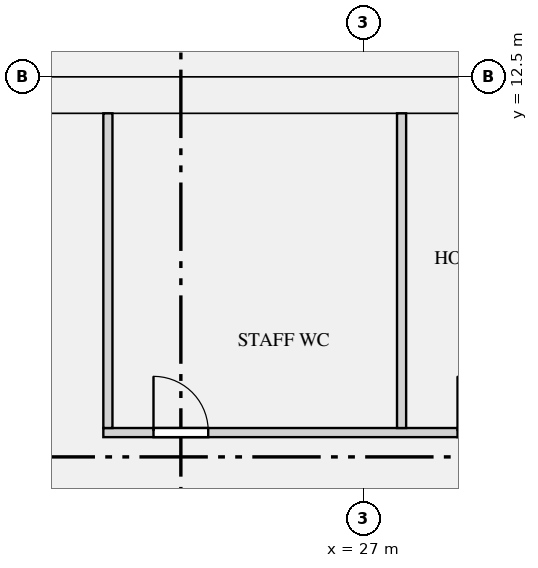
"""IFC4 building model, lengths in metres.
Left out: names, types, materials, properties, quantities, classifications, styles, units other than length and angle.
Written with IfcOpenShell. Run it as: python <this file> out.ifc"""

import sys

from ifc_helpers import new_model, si_unit, direction, frame, frame_2d, origin, place, context, subcontext, project, spatial, rectangle, extrude, element, fill, save


model = new_model("IFC4")
c1 = context("Model", 3, precision=1e-05, world=origin(), true_north=direction((0.0, 1.0)))
c2 = subcontext(c1, "Body", "Model", "MODEL_VIEW")
j1 = project(units=[si_unit("LENGTHUNIT", "METRE"), si_unit("PLANEANGLEUNIT", "RADIAN")], contexts=[c1])
p1 = place(None, origin())
s1 = spatial("IfcSite", under=j1, at=p1, CompositionType="ELEMENT")
p2 = place(p1, origin())
s2 = spatial("IfcBuilding", under=s1, at=p2, CompositionType="ELEMENT")
p3 = place(p2, frame((0.0, 0.0, 83.55)))
s3 = spatial("IfcBuildingStorey", under=s2, at=p3, CompositionType="ELEMENT", Elevation=83.55)
p4 = place(p3, frame((18.8, 12.2, 0.0), z_axis=(0.0, 0.0, 1.0), x_axis=(1.0, 0.0, 0.0)))
e1 = element("IfcWall", 1, at=p4, inside=s3, PredefinedType="SHEAR", context=c2, shape_type="SweptSolid", body=[
    extrude(rectangle(XDim=34.4, YDim=0.6, at=frame_2d((17.2, 0.0))), origin(), (0.0, 0.0, 1.0), 3.15),
])
p5 = place(p4, frame((24.375, 0.0, 0.0)))
e2 = element("IfcOpeningElement", 2, at=p5, cuts=e1, PredefinedType="OPENING", context=c2, shape_type="SweptSolid", body=[
    extrude(rectangle(XDim=1.1, YDim=2.1, at=frame_2d((0.55, 1.05))), frame((0.0, 0.31, 0.0), z_axis=(0.0, -1.0, 0.0), x_axis=(1.0, 0.0, 0.0)), (0.0, 0.0, 1.0), 0.62),
])
p6 = place(p4, frame((26.625, 0.0, 0.0)))
e3 = element("IfcOpeningElement", 3, at=p6, cuts=e1, PredefinedType="OPENING", context=c2, shape_type="SweptSolid", body=[
    extrude(rectangle(XDim=1.1, YDim=2.1, at=frame_2d((0.55, 1.05))), frame((0.0, 0.31, 0.0), z_axis=(0.0, -1.0, 0.0), x_axis=(1.0, 0.0, 0.0)), (0.0, 0.0, 1.0), 0.62),
])
p7 = place(p4, frame((28.875, 0.0, 0.0)))
e4 = element("IfcOpeningElement", 4, at=p7, cuts=e1, PredefinedType="OPENING", context=c2, shape_type="SweptSolid", body=[
    extrude(rectangle(XDim=1.1, YDim=2.1, at=frame_2d((0.55, 1.05))), frame((0.0, 0.31, 0.0), z_axis=(0.0, -1.0, 0.0), x_axis=(1.0, 0.0, 0.0)), (0.0, 0.0, 1.0), 0.62),
])
p8 = place(p4, frame((14.25, 0.0, 0.0)))
e5 = element("IfcOpeningElement", 5, at=p8, cuts=e1, PredefinedType="OPENING", context=c2, shape_type="SweptSolid", body=[
    extrude(rectangle(XDim=0.9, YDim=2.1, at=frame_2d((0.45, 1.05))), frame((0.0, 0.31, 0.0), z_axis=(0.0, -1.0, 0.0), x_axis=(1.0, 0.0, 0.0)), (0.0, 0.0, 1.0), 0.62),
])
p9 = place(p4, frame((1.35, 0.0, 0.0)))
e6 = element("IfcOpeningElement", 6, at=p9, cuts=e1, PredefinedType="OPENING", context=c2, shape_type="SweptSolid", body=[
    extrude(rectangle(XDim=1.2, YDim=2.1, at=frame_2d((0.6, 1.05))), frame((0.0, 0.31, 0.0), z_axis=(0.0, -1.0, 0.0), x_axis=(1.0, 0.0, 0.0)), (0.0, 0.0, 1.0), 0.62),
])
p10 = place(p4, frame((31.85, 0.0, 0.0)))
e7 = element("IfcOpeningElement", 7, at=p10, cuts=e1, PredefinedType="OPENING", context=c2, shape_type="SweptSolid", body=[
    extrude(rectangle(XDim=1.2, YDim=2.1, at=frame_2d((0.6, 1.05))), frame((0.0, 0.31, 0.0), z_axis=(0.0, -1.0, 0.0), x_axis=(1.0, 0.0, 0.0)), (0.0, 0.0, 1.0), 0.62),
])
p11 = place(p3, frame((22.725, 6.65, 0.0), z_axis=(0.0, 0.0, 1.0), x_axis=(1.0, 0.0, 0.0)))
e8 = element("IfcWall", 8, at=p11, inside=s3, PredefinedType="PARTITIONING", context=c2, shape_type="SweptSolid", body=[
    extrude(rectangle(XDim=19.8, YDim=0.15, at=frame_2d((9.9, 0.0))), origin(), (0.0, 0.0, 1.0), 2.83),
])
p12 = place(p11, frame((0.825, 0.0, 0.0)))
e9 = element("IfcOpeningElement", 9, at=p12, cuts=e8, PredefinedType="OPENING", context=c2, shape_type="SweptSolid", body=[
    extrude(rectangle(XDim=0.9, YDim=2.1, at=frame_2d((0.45, 1.05))), frame((0.0, 0.085, 0.0), z_axis=(0.0, -1.0, 0.0), x_axis=(1.0, 0.0, 0.0)), (0.0, 0.0, 1.0), 0.17),
])
p13 = place(p11, frame((5.825, 0.0, 0.0)))
e10 = element("IfcOpeningElement", 10, at=p13, cuts=e8, PredefinedType="OPENING", context=c2, shape_type="SweptSolid", body=[
    extrude(rectangle(XDim=0.9, YDim=2.1, at=frame_2d((0.45, 1.05))), frame((0.0, 0.085, 0.0), z_axis=(0.0, -1.0, 0.0), x_axis=(1.0, 0.0, 0.0)), (0.0, 0.0, 1.0), 0.17),
])
p14 = place(p11, frame((10.325, 0.0, 0.0)))
e11 = element("IfcOpeningElement", 11, at=p14, cuts=e8, PredefinedType="OPENING", context=c2, shape_type="SweptSolid", body=[
    extrude(rectangle(XDim=0.9, YDim=2.1, at=frame_2d((0.45, 1.05))), frame((0.0, 0.085, 0.0), z_axis=(0.0, -1.0, 0.0), x_axis=(1.0, 0.0, 0.0)), (0.0, 0.0, 1.0), 0.17),
])
p15 = place(p11, frame((14.475, 0.0, 0.0)))
e12 = element("IfcOpeningElement", 12, at=p15, cuts=e8, PredefinedType="OPENING", context=c2, shape_type="SweptSolid", body=[
    extrude(rectangle(XDim=0.9, YDim=2.1, at=frame_2d((0.45, 1.05))), frame((0.0, 0.085, 0.0), z_axis=(0.0, -1.0, 0.0), x_axis=(1.0, 0.0, 0.0)), (0.0, 0.0, 1.0), 0.17),
])
p16 = place(p11, frame((17.825, 0.0, 0.0)))
e13 = element("IfcOpeningElement", 13, at=p16, cuts=e8, PredefinedType="OPENING", context=c2, shape_type="SweptSolid", body=[
    extrude(rectangle(XDim=0.9, YDim=2.1, at=frame_2d((0.45, 1.05))), frame((0.0, 0.085, 0.0), z_axis=(0.0, -1.0, 0.0), x_axis=(1.0, 0.0, 0.0)), (0.0, 0.0, 1.0), 0.17),
])
for number, where, z_axis, x_axis in (
    (14, (22.8, 6.725, 0.0), (0.0, 0.0, 1.0), (0.0, 1.0, 0.0)),
    (15, (27.63, 6.725, 0.0), (0.0, 0.0, 1.0), (0.0, 1.0, 0.0)),
):
    element("IfcWall", number, at=place(p3, frame(where, z_axis=z_axis, x_axis=x_axis)), inside=s3, PredefinedType="PARTITIONING", context=c2, shape_type="SweptSolid", body=[
        extrude(rectangle(XDim=5.175, YDim=0.15, at=frame_2d((2.587, 0.0))), origin(), (0.0, 0.0, 1.0), 2.83),
    ])
p17 = place(p12, origin())
e16 = element("IfcDoor", 16, at=p17, inside=s3, OperationType="SINGLE_SWING_LEFT", PredefinedType="DOOR", context=c2, shape_type="SweptSolid", body=[
    extrude(rectangle(XDim=0.9, YDim=2.1, at=frame_2d((0.45, 1.05))), frame((0.0, 0.025, 0.0), z_axis=(0.0, -1.0, 0.0), x_axis=(1.0, 0.0, 0.0)), (0.0, 0.0, 1.0), 0.05),
])
fill(e9, e16)
p18 = place(p13, origin())
e17 = element("IfcDoor", 17, at=p18, inside=s3, OperationType="SINGLE_SWING_LEFT", PredefinedType="DOOR", context=c2, shape_type="SweptSolid", body=[
    extrude(rectangle(XDim=0.9, YDim=2.1, at=frame_2d((0.45, 1.05))), frame((0.0, 0.025, 0.0), z_axis=(0.0, -1.0, 0.0), x_axis=(1.0, 0.0, 0.0)), (0.0, 0.0, 1.0), 0.05),
])
fill(e10, e17)
save(model, sys.argv[1])
